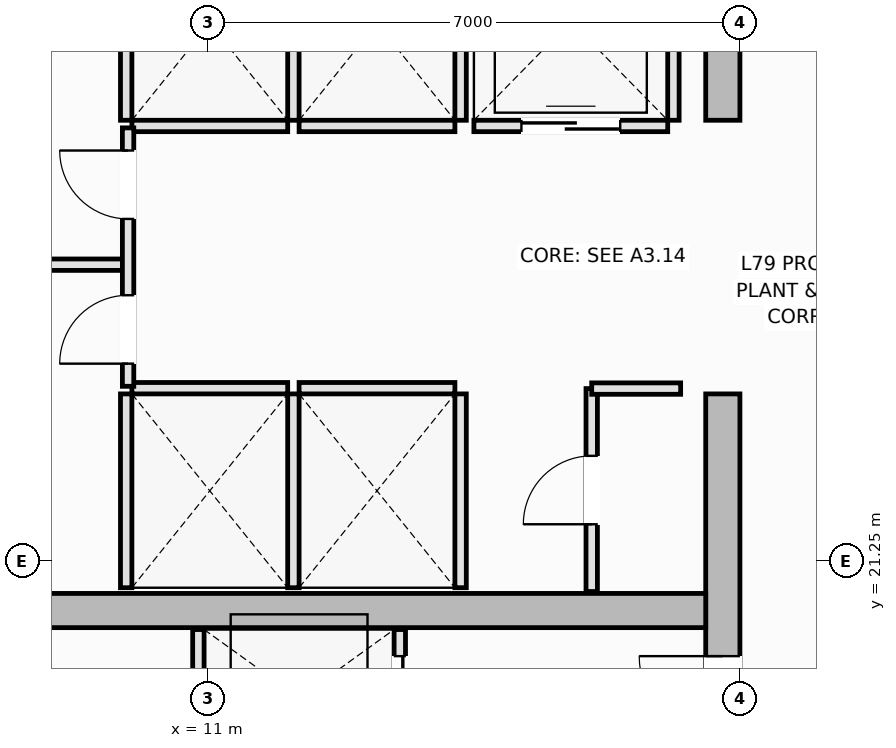
"""IFC4 building model, lengths in metres.
Left out: names, types, materials, properties, quantities, classifications, styles, units other than length and angle.
Written with IfcOpenShell. Run it as: python <this file> out.ifc"""

import sys

from ifc_helpers import new_model, si_unit, direction, frame, frame_2d, origin, place, context, subcontext, project, spatial, rectangle, extrude, element, fill, save


model = new_model("IFC4")
c1 = context("Model", 3, precision=1e-05, world=origin(), true_north=direction((0.0, 1.0)))
c2 = subcontext(c1, "Body", "Model", "MODEL_VIEW")
j1 = project(units=[si_unit("LENGTHUNIT", "METRE"), si_unit("PLANEANGLEUNIT", "RADIAN")], contexts=[c1])
p1 = place(None, origin())
s1 = spatial("IfcSite", under=j1, at=p1, CompositionType="ELEMENT")
p2 = place(p1, origin())
s2 = spatial("IfcBuilding", under=s1, at=p2, CompositionType="ELEMENT")
p3 = place(p2, frame((0.0, 0.0, 296.65)))
s3 = spatial("IfcBuildingStorey", under=s2, at=p3, CompositionType="ELEMENT", Elevation=296.65)
p4 = place(p3, frame((17.775, 14.45, 0.0), z_axis=(0.0, 0.0, 1.0), x_axis=(0.0, 1.0, 0.0)))
e1 = element("IfcWall", 1, at=p4, inside=s3, PredefinedType="SHEAR", context=c2, shape_type="SweptSolid", body=[
    extrude(rectangle(XDim=9.0, YDim=0.45, at=frame_2d((4.5, 0.0))), origin(), (0.0, 0.0, 1.0), 6.4),
])
p5 = place(p4, frame((4.45, 0.0, 0.0)))
e2 = element("IfcOpeningElement", 2, at=p5, cuts=e1, PredefinedType="OPENING", context=c2, shape_type="SweptSolid", body=[
    extrude(rectangle(XDim=1.1, YDim=2.15, at=frame_2d((0.55, 1.075))), frame((0.0, 0.235, 0.0), z_axis=(0.0, -1.0, 0.0), x_axis=(1.0, 0.0, 0.0)), (0.0, 0.0, 1.0), 0.47),
])
p6 = place(p3, frame((17.775, 27.05, 0.0), z_axis=(0.0, 0.0, 1.0), x_axis=(0.0, 1.0, 0.0)))
e3 = element("IfcWall", 3, at=p6, inside=s3, PredefinedType="SHEAR", context=c2, shape_type="SweptSolid", body=[
    extrude(rectangle(XDim=9.0, YDim=0.45, at=frame_2d((4.5, 0.0))), origin(), (0.0, 0.0, 1.0), 6.4),
])
p7 = place(p6, frame((3.45, 0.0, 0.0)))
e4 = element("IfcOpeningElement", 4, at=p7, cuts=e3, PredefinedType="OPENING", context=c2, shape_type="SweptSolid", body=[
    extrude(rectangle(XDim=1.1, YDim=2.15, at=frame_2d((0.55, 1.075))), frame((0.0, 0.235, 0.0), z_axis=(0.0, -1.0, 0.0), x_axis=(1.0, 0.0, 0.0)), (0.0, 0.0, 1.0), 0.47),
])
p8 = place(p3, frame((4.95, 20.6, 0.0), z_axis=(0.0, 0.0, 1.0), x_axis=(1.0, 0.0, 0.0)))
e5 = element("IfcWall", 5, at=p8, inside=s3, PredefinedType="SHEAR", context=c2, shape_type="SweptSolid", body=[
    extrude(rectangle(XDim=12.6, YDim=0.45, at=frame_2d((6.3, 0.0))), origin(), (0.0, 0.0, 1.0), 6.4),
])
p9 = place(p3, frame((10.0, 23.525, 0.0), z_axis=(0.0, 0.0, 1.0), x_axis=(1.0, 0.0, 0.0)))
e6 = element("IfcWall", 6, at=p9, inside=s3, PredefinedType="PARTITIONING", context=c2, shape_type="SweptSolid", body=[
    extrude(rectangle(XDim=2.05, YDim=0.15, at=frame_2d((1.025, 0.0))), origin(), (0.0, 0.0, 1.0), 6.2),
])
for number, where, z_axis, x_axis in (
    (7, (9.925, 20.9, 0.0), (0.0, 0.0, 1.0), (0.0, 1.0, 0.0)),
    (8, (12.125, 20.9, 0.0), (0.0, 0.0, 1.0), (0.0, 1.0, 0.0)),
):
    element("IfcWall", number, at=place(p3, frame(where, z_axis=z_axis, x_axis=x_axis)), inside=s3, PredefinedType="PARTITIONING", context=c2, shape_type="SweptSolid", body=[
        extrude(rectangle(XDim=2.55, YDim=0.15, at=frame_2d((1.275, 0.0))), origin(), (0.0, 0.0, 1.0), 6.2),
    ])
p10 = place(p3, frame((12.2, 23.525, 0.0), z_axis=(0.0, 0.0, 1.0), x_axis=(1.0, 0.0, 0.0)))
e9 = element("IfcWall", 9, at=p10, inside=s3, PredefinedType="PARTITIONING", context=c2, shape_type="SweptSolid", body=[
    extrude(rectangle(XDim=2.05, YDim=0.15, at=frame_2d((1.025, 0.0))), origin(), (0.0, 0.0, 1.0), 6.2),
])
p11 = place(p3, frame((14.325, 20.9, 0.0), z_axis=(0.0, 0.0, 1.0), x_axis=(0.0, 1.0, 0.0)))
e10 = element("IfcWall", 10, at=p11, inside=s3, PredefinedType="PARTITIONING", context=c2, shape_type="SweptSolid", body=[
    extrude(rectangle(XDim=2.55, YDim=0.15, at=frame_2d((1.275, 0.0))), origin(), (0.0, 0.0, 1.0), 6.2),
])
p12 = place(p3, frame((10.0, 26.975, 0.0), z_axis=(0.0, 0.0, 1.0), x_axis=(1.0, 0.0, 0.0)))
e11 = element("IfcWall", 11, at=p12, inside=s3, PredefinedType="PARTITIONING", context=c2, shape_type="SweptSolid", body=[
    extrude(rectangle(XDim=2.05, YDim=0.15, at=frame_2d((1.025, 0.0))), origin(), (0.0, 0.0, 1.0), 6.2),
])
for number, where, z_axis, x_axis in (
    (12, (9.925, 27.05, 0.0), (0.0, 0.0, 1.0), (0.0, 1.0, 0.0)),
    (13, (12.125, 27.05, 0.0), (0.0, 0.0, 1.0), (0.0, 1.0, 0.0)),
):
    element("IfcWall", number, at=place(p3, frame(where, z_axis=z_axis, x_axis=x_axis)), inside=s3, PredefinedType="PARTITIONING", context=c2, shape_type="SweptSolid", body=[
        extrude(rectangle(XDim=2.55, YDim=0.15, at=frame_2d((1.275, 0.0))), origin(), (0.0, 0.0, 1.0), 6.2),
    ])
p13 = place(p3, frame((12.2, 26.975, 0.0), z_axis=(0.0, 0.0, 1.0), x_axis=(1.0, 0.0, 0.0)))
e14 = element("IfcWall", 14, at=p13, inside=s3, PredefinedType="PARTITIONING", context=c2, shape_type="SweptSolid", body=[
    extrude(rectangle(XDim=2.05, YDim=0.15, at=frame_2d((1.025, 0.0))), origin(), (0.0, 0.0, 1.0), 6.2),
])
p14 = place(p3, frame((14.325, 27.05, 0.0), z_axis=(0.0, 0.0, 1.0), x_axis=(0.0, 1.0, 0.0)))
e15 = element("IfcWall", 15, at=p14, inside=s3, PredefinedType="PARTITIONING", context=c2, shape_type="SweptSolid", body=[
    extrude(rectangle(XDim=2.55, YDim=0.15, at=frame_2d((1.275, 0.0))), origin(), (0.0, 0.0, 1.0), 6.2),
])
p15 = place(p3, frame((14.5, 26.975, 0.0), z_axis=(0.0, 0.0, 1.0), x_axis=(1.0, 0.0, 0.0)))
e16 = element("IfcWall", 16, at=p15, inside=s3, PredefinedType="PARTITIONING", context=c2, shape_type="SweptSolid", body=[
    extrude(rectangle(XDim=2.55, YDim=0.15, at=frame_2d((1.275, 0.0))), origin(), (0.0, 0.0, 1.0), 6.2),
])
p16 = place(p15, frame((0.625, 0.0, 0.0)))
e17 = element("IfcOpeningElement", 17, at=p16, cuts=e16, PredefinedType="OPENING", context=c2, shape_type="SweptSolid", body=[
    extrude(rectangle(XDim=1.3, YDim=2.2, at=frame_2d((0.65, 1.1))), frame((0.0, 0.085, 0.0), z_axis=(0.0, -1.0, 0.0), x_axis=(1.0, 0.0, 0.0)), (0.0, 0.0, 1.0), 0.17),
])
p17 = place(p3, frame((17.125, 27.05, 0.0), z_axis=(0.0, 0.0, 1.0), x_axis=(0.0, 1.0, 0.0)))
e18 = element("IfcWall", 18, at=p17, inside=s3, PredefinedType="PARTITIONING", context=c2, shape_type="SweptSolid", body=[
    extrude(rectangle(XDim=2.6, YDim=0.15, at=frame_2d((1.3, 0.0))), origin(), (0.0, 0.0, 1.0), 6.2),
])
p18 = place(p3, frame((10.875, 18.55, 0.0), z_axis=(0.0, 0.0, 1.0), x_axis=(0.0, 1.0, 0.0)))
e19 = element("IfcWall", 19, at=p18, inside=s3, PredefinedType="PARTITIONING", context=c2, shape_type="SweptSolid", body=[
    extrude(rectangle(XDim=1.8, YDim=0.15, at=frame_2d((0.9, 0.0))), origin(), (0.0, 0.0, 1.0), 6.2),
])
p19 = place(p3, frame((13.525, 18.55, 0.0), z_axis=(0.0, 0.0, 1.0), x_axis=(0.0, 1.0, 0.0)))
e20 = element("IfcWall", 20, at=p19, inside=s3, PredefinedType="PARTITIONING", context=c2, shape_type="SweptSolid", body=[
    extrude(rectangle(XDim=1.8, YDim=0.15, at=frame_2d((0.9, 0.0))), origin(), (0.0, 0.0, 1.0), 6.2),
])
p20 = place(p19, frame((0.35, 0.0, 0.0)))
e21 = element("IfcOpeningElement", 21, at=p20, cuts=e20, PredefinedType="OPENING", context=c2, shape_type="SweptSolid", body=[
    extrude(rectangle(XDim=1.1, YDim=2.2, at=frame_2d((0.55, 1.1))), frame((0.0, 0.085, 0.0), z_axis=(0.0, -1.0, 0.0), x_axis=(1.0, 0.0, 0.0)), (0.0, 0.0, 1.0), 0.17),
])
p21 = place(p3, frame((4.95, 25.15, 0.0), z_axis=(0.0, 0.0, 1.0), x_axis=(1.0, 0.0, 0.0)))
e22 = element("IfcWall", 22, at=p21, inside=s3, PredefinedType="PARTITIONING", context=c2, shape_type="SweptSolid", body=[
    extrude(rectangle(XDim=5.0, YDim=0.15, at=frame_2d((2.5, 0.0))), origin(), (0.0, 0.0, 1.0), 6.2),
])
p22 = place(p3, frame((9.95, 23.55, 0.0), z_axis=(0.0, 0.0, 1.0), x_axis=(0.0, 1.0, 0.0)))
e23 = element("IfcWall", 23, at=p22, inside=s3, PredefinedType="PARTITIONING", context=c2, shape_type="SweptSolid", body=[
    extrude(rectangle(XDim=3.4, YDim=0.15, at=frame_2d((1.7, 0.0))), origin(), (0.0, 0.0, 1.0), 6.2),
])
p23 = place(p22, frame((0.298, 0.0, 0.0)))
e24 = element("IfcOpeningElement", 24, at=p23, cuts=e23, PredefinedType="OPENING", context=c2, shape_type="SweptSolid", body=[
    extrude(rectangle(XDim=0.9, YDim=2.1, at=frame_2d((0.45, 1.05))), frame((0.0, 0.085, 0.0), z_axis=(0.0, -1.0, 0.0), x_axis=(1.0, 0.0, 0.0)), (0.0, 0.0, 1.0), 0.17),
])
p24 = place(p22, frame((2.202, 0.0, 0.0)))
e25 = element("IfcOpeningElement", 25, at=p24, cuts=e23, PredefinedType="OPENING", context=c2, shape_type="SweptSolid", body=[
    extrude(rectangle(XDim=0.9, YDim=2.1, at=frame_2d((0.45, 1.05))), frame((0.0, 0.085, 0.0), z_axis=(0.0, -1.0, 0.0), x_axis=(1.0, 0.0, 0.0)), (0.0, 0.0, 1.0), 0.17),
])
p25 = place(p3, frame((16.05, 20.85, 0.0), z_axis=(0.0, 0.0, 1.0), x_axis=(0.0, 1.0, 0.0)))
e26 = element("IfcWall", 26, at=p25, inside=s3, PredefinedType="PARTITIONING", context=c2, shape_type="SweptSolid", body=[
    extrude(rectangle(XDim=2.67, YDim=0.15, at=frame_2d((1.335, 0.0))), origin(), (0.0, 0.0, 1.0), 6.2),
])
p26 = place(p25, frame((0.885, 0.0, 0.0)))
e27 = element("IfcOpeningElement", 27, at=p26, cuts=e26, PredefinedType="OPENING", context=c2, shape_type="SweptSolid", body=[
    extrude(rectangle(XDim=0.9, YDim=2.1, at=frame_2d((0.45, 1.05))), frame((0.0, 0.085, 0.0), z_axis=(0.0, -1.0, 0.0), x_axis=(1.0, 0.0, 0.0)), (0.0, 0.0, 1.0), 0.17),
])
p27 = place(p3, frame((16.05, 23.52, 0.0), z_axis=(0.0, 0.0, 1.0), x_axis=(1.0, 0.0, 0.0)))
e28 = element("IfcWall", 28, at=p27, inside=s3, PredefinedType="PARTITIONING", context=c2, shape_type="SweptSolid", body=[
    extrude(rectangle(XDim=1.17, YDim=0.15, at=frame_2d((0.585, 0.0))), origin(), (0.0, 0.0, 1.0), 6.2),
])
p28 = place(p16, origin())
e29 = element("IfcDoor", 29, at=p28, inside=s3, OperationType="DOUBLE_DOOR_SLIDING", PredefinedType="DOOR", context=c2, shape_type="SweptSolid", body=[
    extrude(rectangle(XDim=1.3, YDim=2.2, at=frame_2d((0.65, 1.1))), frame((0.0, 0.025, 0.0), z_axis=(0.0, -1.0, 0.0), x_axis=(1.0, 0.0, 0.0)), (0.0, 0.0, 1.0), 0.05),
])
fill(e17, e29)
p29 = place(p20, origin())
e30 = element("IfcDoor", 30, at=p29, inside=s3, OperationType="DOUBLE_DOOR_SLIDING", PredefinedType="DOOR", context=c2, shape_type="SweptSolid", body=[
    extrude(rectangle(XDim=1.1, YDim=2.2, at=frame_2d((0.55, 1.1))), frame((0.0, 0.025, 0.0), z_axis=(0.0, -1.0, 0.0), x_axis=(1.0, 0.0, 0.0)), (0.0, 0.0, 1.0), 0.05),
])
fill(e21, e30)
p30 = place(p5, origin())
e31 = element("IfcDoor", 31, at=p30, inside=s3, OperationType="SINGLE_SWING_RIGHT", PredefinedType="DOOR", context=c2, shape_type="SweptSolid", body=[
    extrude(rectangle(XDim=1.1, YDim=2.15, at=frame_2d((0.55, 1.075))), frame((0.0, 0.025, 0.0), z_axis=(0.0, -1.0, 0.0), x_axis=(1.0, 0.0, 0.0)), (0.0, 0.0, 1.0), 0.05),
])
fill(e2, e31)
p31 = place(p23, origin())
e32 = element("IfcDoor", 32, at=p31, inside=s3, OperationType="SINGLE_SWING_LEFT", PredefinedType="DOOR", context=c2, shape_type="SweptSolid", body=[
    extrude(rectangle(XDim=0.9, YDim=2.1, at=frame_2d((0.45, 1.05))), frame((0.0, 0.025, 0.0), z_axis=(0.0, -1.0, 0.0), x_axis=(1.0, 0.0, 0.0)), (0.0, 0.0, 1.0), 0.05),
])
fill(e24, e32)
p32 = place(p24, origin())
e33 = element("IfcDoor", 33, at=p32, inside=s3, OperationType="SINGLE_SWING_RIGHT", PredefinedType="DOOR", context=c2, shape_type="SweptSolid", body=[
    extrude(rectangle(XDim=0.9, YDim=2.1, at=frame_2d((0.45, 1.05))), frame((0.0, 0.025, 0.0), z_axis=(0.0, -1.0, 0.0), x_axis=(1.0, 0.0, 0.0)), (0.0, 0.0, 1.0), 0.05),
])
fill(e25, e33)
p33 = place(p26, origin())
e34 = element("IfcDoor", 34, at=p33, inside=s3, OperationType="SINGLE_SWING_LEFT", PredefinedType="DOOR", context=c2, shape_type="SweptSolid", body=[
    extrude(rectangle(XDim=0.9, YDim=2.1, at=frame_2d((0.45, 1.05))), frame((0.0, 0.025, 0.0), z_axis=(0.0, -1.0, 0.0), x_axis=(1.0, 0.0, 0.0)), (0.0, 0.0, 1.0), 0.05),
])
fill(e27, e34)
save(model, sys.argv[1])
